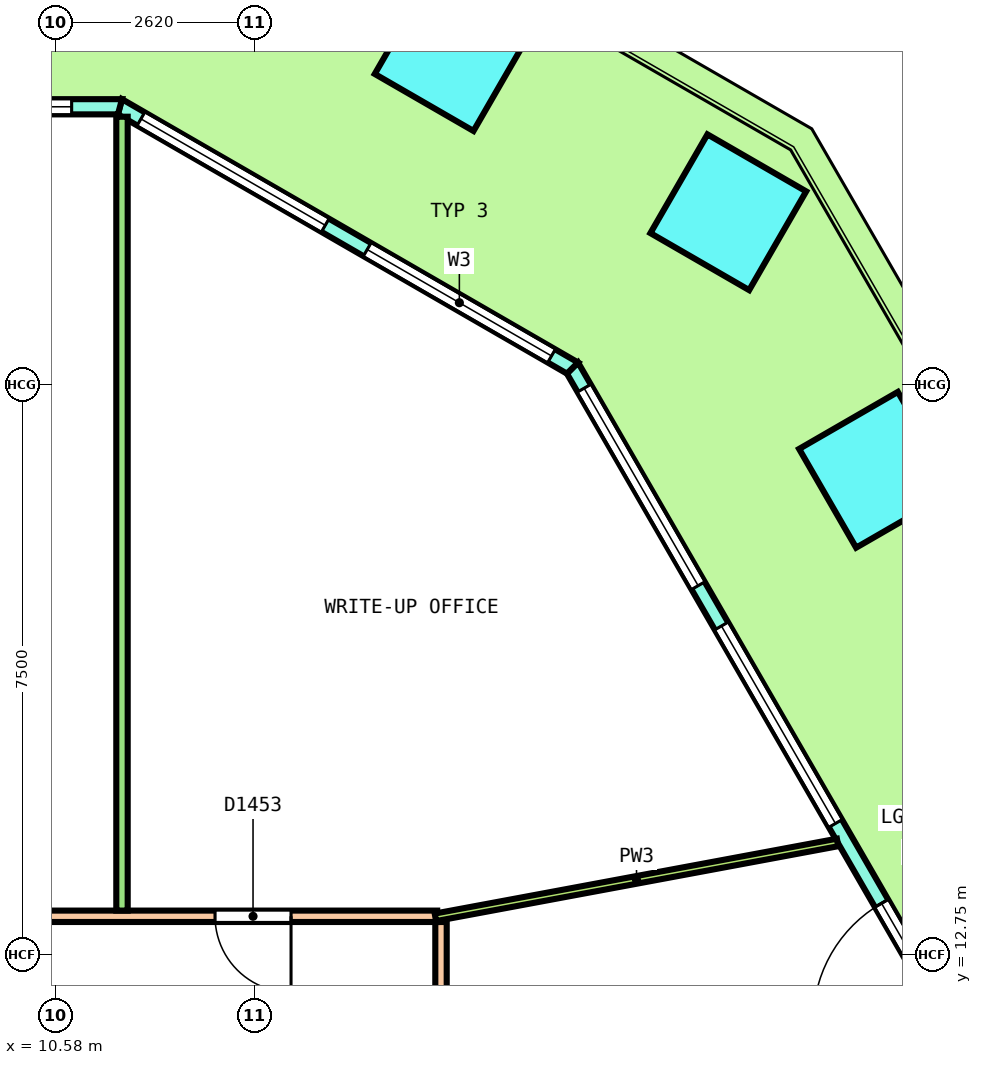
"""IFC4 building model, lengths in metres.
Left out: names, types, materials, properties, quantities, classifications, styles, units other than length and angle.
Written with IfcOpenShell. Run it as: python <this file> out.ifc"""

import sys

from ifc_helpers import new_model, si_unit, direction, frame, frame_2d, origin, origin_2d, place, context, subcontext, project, spatial, polyline, rectangle, outline, extrude, element, fill, save


model = new_model("IFC4")
c1 = context("Model", 3, precision=1e-05, world=origin(), true_north=direction((0.0, 1.0)))
c2 = subcontext(c1, "Body", "Model", "MODEL_VIEW")
j1 = project(units=[si_unit("LENGTHUNIT", "METRE"), si_unit("PLANEANGLEUNIT", "RADIAN")], contexts=[c1])
p1 = place(None, origin())
s1 = spatial("IfcSite", under=j1, at=p1, CompositionType="ELEMENT")
p2 = place(p1, origin())
s2 = spatial("IfcBuilding", under=s1, at=p2, CompositionType="ELEMENT")
p3 = place(p2, frame((0.0, 0.0, 63.0)))
s3 = spatial("IfcBuildingStorey", under=s2, at=p3, CompositionType="ELEMENT", Elevation=63.0)
for number, where, z_axis, x_axis in (
    (1, (21.386, 19.124, 0.0), (0.0, 0.0, 1.0), (-0.5, 0.866, 0.0)),
    (2, (19.43, 22.512, 0.0), (0.0, 0.0, 1.0), (-0.866, 0.5, 0.0)),
    (3, (15.803, 24.606, 0.0), (0.0, 0.0, 1.0), (-0.866, 0.5, 0.0)),
):
    element("IfcColumn", number, at=place(p3, frame(where, z_axis=z_axis, x_axis=x_axis)), inside=s3, PredefinedType="COLUMN", context=c2, shape_type="SweptSolid", body=[
        extrude(rectangle(XDim=1.5, YDim=1.5, at=origin_2d()), origin(), (0.0, 0.0, 1.0), 4.04),
    ])
p4 = place(p3, frame((26.411, 4.82, 0.0), z_axis=(0.0, 0.0, 1.0), x_axis=(-0.500000137386, 0.866025324465, 0.0)))
e4 = element("IfcWall", 4, at=p4, inside=s3, PredefinedType="SOLIDWALL", context=c2, shape_type="SweptSolid", body=[
    extrude(outline(polyline([(-0.027, -0.1), (0.979, -0.1), (1.986, -0.1), (2.992, -0.1), (3.999, -0.1), (5.005, -0.1), (6.012, -0.1), (7.018, -0.1), (8.025, -0.1), (9.031, -0.1), (10.038, -0.1), (11.044, -0.1), (12.051, -0.1), (13.057, -0.1), (14.063, -0.1), (15.07, -0.1), (16.076, -0.1), (17.083, -0.1), (18.089, -0.1), (18.036, 0.1), (17.035, 0.1), (16.035, 0.1), (15.034, 0.1), (14.034, 0.1), (13.033, 0.1), (12.033, 0.1), (11.032, 0.1), (10.032, 0.1), (9.031, 0.1), (8.031, 0.1), (7.03, 0.1), (6.03, 0.1), (5.029, 0.1), (4.029, 0.1), (3.028, 0.1), (2.028, 0.1), (1.027, 0.1), (0.027, 0.1), (-0.027, -0.1)])), origin(), (0.0, 0.0, 1.0), 4.1),
])
p5 = place(p4, frame((0.306, 0.0, 0.1)))
e5 = element("IfcOpeningElement", 5, at=p5, cuts=e4, PredefinedType="OPENING", context=c2, shape_type="SweptSolid", body=[
    extrude(rectangle(XDim=3.0, YDim=2.9, at=frame_2d((1.5, 1.45))), frame((0.0, 0.11, 0.0), z_axis=(0.0, -1.0, 0.0), x_axis=(1.0, 0.0, 0.0)), (0.0, 0.0, 1.0), 0.22),
])
p6 = place(p4, frame((3.919, 0.0, 0.1)))
e6 = element("IfcOpeningElement", 6, at=p6, cuts=e4, PredefinedType="OPENING", context=c2, shape_type="SweptSolid", body=[
    extrude(rectangle(XDim=3.0, YDim=2.9, at=frame_2d((1.5, 1.45))), frame((0.0, 0.11, 0.0), z_axis=(0.0, -1.0, 0.0), x_axis=(1.0, 0.0, 0.0)), (0.0, 0.0, 1.0), 0.22),
])
p7 = place(p4, frame((8.131, 0.0, 0.0)))
e7 = element("IfcOpeningElement", 7, at=p7, cuts=e4, PredefinedType="OPENING", context=c2, shape_type="SweptSolid", body=[
    extrude(rectangle(XDim=1.8, YDim=2.4, at=frame_2d((0.9, 1.2))), frame((0.0, 0.11, 0.0), z_axis=(0.0, -1.0, 0.0), x_axis=(1.0, 0.0, 0.0)), (0.0, 0.0, 1.0), 0.22),
])
p8 = place(p4, frame((8.131, 0.0, 2.55)))
e8 = element("IfcOpeningElement", 8, at=p8, cuts=e4, PredefinedType="OPENING", context=c2, shape_type="SweptSolid", body=[
    extrude(rectangle(XDim=1.8, YDim=0.45, at=frame_2d((0.9, 0.225))), frame((0.0, 0.11, 0.0), z_axis=(0.0, -1.0, 0.0), x_axis=(1.0, 0.0, 0.0)), (0.0, 0.0, 1.0), 0.22),
])
p9 = place(p4, frame((11.144, 0.0, 0.1)))
e9 = element("IfcOpeningElement", 9, at=p9, cuts=e4, PredefinedType="OPENING", context=c2, shape_type="SweptSolid", body=[
    extrude(rectangle(XDim=3.0, YDim=2.9, at=frame_2d((1.5, 1.45))), frame((0.0, 0.11, 0.0), z_axis=(0.0, -1.0, 0.0), x_axis=(1.0, 0.0, 0.0)), (0.0, 0.0, 1.0), 0.22),
])
p10 = place(p4, frame((14.756, 0.0, 0.1)))
e10 = element("IfcOpeningElement", 10, at=p10, cuts=e4, PredefinedType="OPENING", context=c2, shape_type="SweptSolid", body=[
    extrude(rectangle(XDim=3.0, YDim=2.9, at=frame_2d((1.5, 1.45))), frame((0.0, 0.11, 0.0), z_axis=(0.0, -1.0, 0.0), x_axis=(1.0, 0.0, 0.0)), (0.0, 0.0, 1.0), 0.22),
])
p11 = place(p3, frame((17.38, 20.463, 0.0), z_axis=(0.0, 0.0, 1.0), x_axis=(-0.866029458321, 0.49999297727, 0.0)))
e11 = element("IfcWall", 11, at=p11, inside=s3, PredefinedType="SOLIDWALL", context=c2, shape_type="SweptSolid", body=[
    extrude(outline(polyline([(-0.027, -0.1), (1.128, -0.1), (2.282, -0.1), (3.437, -0.1), (4.592, -0.1), (5.747, -0.1), (6.901, -0.1), (6.848, 0.1), (5.711, 0.1), (4.574, 0.1), (3.437, 0.1), (2.301, 0.1), (1.164, 0.1), (0.027, 0.1), (-0.027, -0.1)])), origin(), (0.0, 0.0, 1.0), 4.1),
])
p12 = place(p11, frame((0.319, 0.0, 0.1)))
e12 = element("IfcOpeningElement", 12, at=p12, cuts=e11, PredefinedType="OPENING", context=c2, shape_type="SweptSolid", body=[
    extrude(rectangle(XDim=2.8, YDim=2.9, at=frame_2d((1.4, 1.45))), frame((0.0, 0.11, 0.0), z_axis=(0.0, -1.0, 0.0), x_axis=(1.0, 0.0, 0.0)), (0.0, 0.0, 1.0), 0.22),
])
p13 = place(p11, frame((3.756, 0.0, 0.1)))
e13 = element("IfcOpeningElement", 13, at=p13, cuts=e11, PredefinedType="OPENING", context=c2, shape_type="SweptSolid", body=[
    extrude(rectangle(XDim=2.8, YDim=2.9, at=frame_2d((1.4, 1.45))), frame((0.0, 0.11, 0.0), z_axis=(0.0, -1.0, 0.0), x_axis=(1.0, 0.0, 0.0)), (0.0, 0.0, 1.0), 0.22),
])
p14 = place(p3, frame((11.426, 23.9, 0.0), z_axis=(0.0, 0.0, 1.0), x_axis=(-1.0, 0.0, 0.0)))
e14 = element("IfcWall", 14, at=p14, inside=s3, PredefinedType="SOLIDWALL", context=c2, shape_type="SweptSolid", body=[
    extrude(outline(polyline([(-0.027, -0.1), (1.014, -0.1), (2.055, -0.1), (3.097, -0.1), (4.138, -0.1), (5.179, -0.1), (6.22, -0.1), (7.261, -0.1), (8.303, -0.1), (9.344, -0.1), (10.385, -0.1), (11.426, -0.1), (12.468, -0.1), (13.509, -0.1), (14.55, -0.1), (15.591, -0.1), (16.632, -0.1), (17.673, -0.1), (18.715, -0.1), (19.756, -0.1), (20.797, -0.1), (21.838, -0.1), (22.879, -0.1), (22.826, 0.1), (21.789, 0.1), (20.753, 0.1), (19.717, 0.1), (18.68, 0.1), (17.644, 0.1), (16.608, 0.1), (15.572, 0.1), (14.535, 0.1), (13.499, 0.1), (12.463, 0.1), (11.426, 0.1), (10.39, 0.1), (9.354, 0.1), (8.317, 0.1), (7.281, 0.1), (6.245, 0.1), (5.208, 0.1), (4.172, 0.1), (3.136, 0.1), (2.099, 0.1), (1.063, 0.1), (0.027, 0.1), (-0.027, -0.1)])), origin(), (0.0, 0.0, 1.0), 4.1),
])
p15 = place(p14, frame((0.635, 0.0, 0.1)))
e15 = element("IfcOpeningElement", 15, at=p15, cuts=e14, PredefinedType="OPENING", context=c2, shape_type="SweptSolid", body=[
    extrude(rectangle(XDim=3.3, YDim=2.9, at=frame_2d((1.65, 1.45))), frame((0.0, 0.11, 0.0), z_axis=(0.0, -1.0, 0.0), x_axis=(1.0, 0.0, 0.0)), (0.0, 0.0, 1.0), 0.22),
])
p16 = place(p14, frame((5.206, 0.0, 0.1)))
e16 = element("IfcOpeningElement", 16, at=p16, cuts=e14, PredefinedType="OPENING", context=c2, shape_type="SweptSolid", body=[
    extrude(rectangle(XDim=3.3, YDim=2.9, at=frame_2d((1.65, 1.45))), frame((0.0, 0.11, 0.0), z_axis=(0.0, -1.0, 0.0), x_axis=(1.0, 0.0, 0.0)), (0.0, 0.0, 1.0), 0.22),
])
p17 = place(p14, frame((10.526, 0.0, 0.0)))
e17 = element("IfcOpeningElement", 17, at=p17, cuts=e14, PredefinedType="OPENING", context=c2, shape_type="SweptSolid", body=[
    extrude(rectangle(XDim=1.8, YDim=2.4, at=frame_2d((0.9, 1.2))), frame((0.0, 0.11, 0.0), z_axis=(0.0, -1.0, 0.0), x_axis=(1.0, 0.0, 0.0)), (0.0, 0.0, 1.0), 0.22),
])
p18 = place(p14, frame((10.526, 0.0, 2.55)))
e18 = element("IfcOpeningElement", 18, at=p18, cuts=e14, PredefinedType="OPENING", context=c2, shape_type="SweptSolid", body=[
    extrude(rectangle(XDim=1.8, YDim=0.45, at=frame_2d((0.9, 0.225))), frame((0.0, 0.11, 0.0), z_axis=(0.0, -1.0, 0.0), x_axis=(1.0, 0.0, 0.0)), (0.0, 0.0, 1.0), 0.22),
])
p19 = place(p14, frame((14.347, 0.0, 0.1)))
e19 = element("IfcOpeningElement", 19, at=p19, cuts=e14, PredefinedType="OPENING", context=c2, shape_type="SweptSolid", body=[
    extrude(rectangle(XDim=3.3, YDim=2.9, at=frame_2d((1.65, 1.45))), frame((0.0, 0.11, 0.0), z_axis=(0.0, -1.0, 0.0), x_axis=(1.0, 0.0, 0.0)), (0.0, 0.0, 1.0), 0.22),
])
p20 = place(p14, frame((18.917, 0.0, 0.1)))
e20 = element("IfcOpeningElement", 20, at=p20, cuts=e14, PredefinedType="OPENING", context=c2, shape_type="SweptSolid", body=[
    extrude(rectangle(XDim=3.3, YDim=2.9, at=frame_2d((1.65, 1.45))), frame((0.0, 0.11, 0.0), z_axis=(0.0, -1.0, 0.0), x_axis=(1.0, 0.0, 0.0)), (0.0, 0.0, 1.0), 0.22),
])
p21 = place(p3, frame((15.65, -13.175, 0.0), z_axis=(0.0, 0.0, 1.0), x_axis=(0.0, 1.0, 0.0)))
e21 = element("IfcWall", 21, at=p21, inside=s3, PredefinedType="PARTITIONING", context=c2, shape_type="SweptSolid", body=[
    extrude(rectangle(XDim=26.35, YDim=0.15, at=frame_2d((13.175, 0.0))), origin(), (0.0, 0.0, 1.0), 3.05),
])
p22 = place(p21, frame((16.576, 0.0, 0.0)))
e22 = element("IfcOpeningElement", 22, at=p22, cuts=e21, PredefinedType="OPENING", context=c2, shape_type="SweptSolid", body=[
    extrude(rectangle(XDim=1.2, YDim=2.1, at=frame_2d((0.6, 1.05))), frame((0.0, 0.085, 0.0), z_axis=(0.0, -1.0, 0.0), x_axis=(1.0, 0.0, 0.0)), (0.0, 0.0, 1.0), 0.17),
])
p23 = place(p21, frame((22.401, 0.0, 0.0)))
e23 = element("IfcOpeningElement", 23, at=p23, cuts=e21, PredefinedType="OPENING", context=c2, shape_type="SweptSolid", body=[
    extrude(rectangle(XDim=1.0, YDim=2.1, at=frame_2d((0.5, 1.05))), frame((0.0, 0.085, 0.0), z_axis=(0.0, -1.0, 0.0), x_axis=(1.0, 0.0, 0.0)), (0.0, 0.0, 1.0), 0.17),
])
p24 = place(p21, frame((1.65, 0.0, 0.0)))
e24 = element("IfcOpeningElement", 24, at=p24, cuts=e21, PredefinedType="OPENING", context=c2, shape_type="SweptSolid", body=[
    extrude(rectangle(XDim=1.0, YDim=2.1, at=frame_2d((0.5, 1.05))), frame((0.0, 0.085, 0.0), z_axis=(0.0, -1.0, 0.0), x_axis=(1.0, 0.0, 0.0)), (0.0, 0.0, 1.0), 0.17),
])
p25 = place(p3, frame((-15.575, 13.25, 0.0), z_axis=(0.0, 0.0, 1.0), x_axis=(1.0, 0.0, 0.0)))
e25 = element("IfcWall", 25, at=p25, inside=s3, PredefinedType="PARTITIONING", context=c2, shape_type="SweptSolid", body=[
    extrude(rectangle(XDim=31.175, YDim=0.15, at=frame_2d((15.587, 0.0))), origin(), (0.0, 0.0, 1.0), 3.05),
])
p26 = place(p25, frame((28.252, 0.0, 0.0)))
e26 = element("IfcOpeningElement", 26, at=p26, cuts=e25, PredefinedType="OPENING", context=c2, shape_type="SweptSolid", body=[
    extrude(rectangle(XDim=1.0, YDim=2.1, at=frame_2d((0.5, 1.05))), frame((0.0, 0.085, 0.0), z_axis=(0.0, -1.0, 0.0), x_axis=(1.0, 0.0, 0.0)), (0.0, 0.0, 1.0), 0.17),
])
p27 = place(p25, frame((14.802, 0.0, 0.0)))
e27 = element("IfcOpeningElement", 27, at=p27, cuts=e25, PredefinedType="OPENING", context=c2, shape_type="SweptSolid", body=[
    extrude(rectangle(XDim=1.2, YDim=2.1, at=frame_2d((0.6, 1.05))), frame((0.0, 0.085, 0.0), z_axis=(0.0, -1.0, 0.0), x_axis=(1.0, 0.0, 0.0)), (0.0, 0.0, 1.0), 0.17),
])
p28 = place(p25, frame((5.812, 0.0, 0.0)))
e28 = element("IfcOpeningElement", 28, at=p28, cuts=e25, PredefinedType="OPENING", context=c2, shape_type="SweptSolid", body=[
    extrude(rectangle(XDim=1.2, YDim=2.1, at=frame_2d((0.6, 1.05))), frame((0.0, 0.085, 0.0), z_axis=(0.0, -1.0, 0.0), x_axis=(1.0, 0.0, 0.0)), (0.0, 0.0, 1.0), 0.17),
])
p29 = place(p25, frame((0.849, 0.0, 0.0)))
e29 = element("IfcOpeningElement", 29, at=p29, cuts=e25, PredefinedType="OPENING", context=c2, shape_type="SweptSolid", body=[
    extrude(rectangle(XDim=1.2, YDim=2.1, at=frame_2d((0.6, 1.05))), frame((0.0, 0.085, 0.0), z_axis=(0.0, -1.0, 0.0), x_axis=(1.0, 0.0, 0.0)), (0.0, 0.0, 1.0), 0.17),
])
p30 = place(p3, frame((11.453, 13.325, 0.0), z_axis=(0.0, 0.0, 1.0), x_axis=(0.0, 1.0, 0.0)))
e30 = element("IfcWall", 30, at=p30, inside=s3, PredefinedType="PARTITIONING", context=c2, shape_type="SweptSolid", body=[
    extrude(rectangle(XDim=10.444, YDim=0.15, at=frame_2d((5.222, 0.0))), origin(), (0.0, 0.0, 1.0), 3.05),
])
p31 = place(p3, frame((15.576, 13.236, 0.0), z_axis=(0.0, 0.0, 1.0), x_axis=(0.983108608108, 0.183023126037, 0.0)))
e31 = element("IfcWall", 31, at=p31, inside=s3, PredefinedType="PARTITIONING", context=c2, shape_type="SweptSolid", body=[
    extrude(rectangle(XDim=5.382, YDim=0.1, at=frame_2d((2.691, 0.0))), origin(), (0.0, 0.0, 1.0), 3.05),
])
p32 = place(p7, origin())
e32 = element("IfcDoor", 32, at=p32, inside=s3, OperationType="DOUBLE_DOOR_SINGLE_SWING", PredefinedType="DOOR", context=c2, shape_type="SweptSolid", body=[
    extrude(rectangle(XDim=1.8, YDim=2.4, at=frame_2d((0.9, 1.2))), frame((0.0, 0.025, 0.0), z_axis=(0.0, -1.0, 0.0), x_axis=(1.0, 0.0, 0.0)), (0.0, 0.0, 1.0), 0.05),
])
fill(e7, e32)
p33 = place(p8, origin())
e33 = element("IfcWindow", 33, at=p33, inside=s3, PartitioningType="SINGLE_PANEL", PredefinedType="WINDOW", context=c2, shape_type="SweptSolid", body=[
    extrude(rectangle(XDim=1.8, YDim=0.45, at=frame_2d((0.9, 0.225))), frame((0.0, 0.03, 0.0), z_axis=(0.0, -1.0, 0.0), x_axis=(1.0, 0.0, 0.0)), (0.0, 0.0, 1.0), 0.06),
])
fill(e8, e33)
p34 = place(p9, origin())
e34 = element("IfcWindow", 34, at=p34, inside=s3, PartitioningType="SINGLE_PANEL", PredefinedType="WINDOW", context=c2, shape_type="SweptSolid", body=[
    extrude(rectangle(XDim=3.0, YDim=2.9, at=frame_2d((1.5, 1.45))), frame((0.0, 0.03, 0.0), z_axis=(0.0, -1.0, 0.0), x_axis=(1.0, 0.0, 0.0)), (0.0, 0.0, 1.0), 0.06),
])
fill(e9, e34)
p35 = place(p10, origin())
e35 = element("IfcWindow", 35, at=p35, inside=s3, PartitioningType="SINGLE_PANEL", PredefinedType="WINDOW", context=c2, shape_type="SweptSolid", body=[
    extrude(rectangle(XDim=3.0, YDim=2.9, at=frame_2d((1.5, 1.45))), frame((0.0, 0.03, 0.0), z_axis=(0.0, -1.0, 0.0), x_axis=(1.0, 0.0, 0.0)), (0.0, 0.0, 1.0), 0.06),
])
fill(e10, e35)
p36 = place(p12, origin())
e36 = element("IfcWindow", 36, at=p36, inside=s3, PartitioningType="SINGLE_PANEL", PredefinedType="WINDOW", context=c2, shape_type="SweptSolid", body=[
    extrude(rectangle(XDim=2.8, YDim=2.9, at=frame_2d((1.4, 1.45))), frame((0.0, 0.03, 0.0), z_axis=(0.0, -1.0, 0.0), x_axis=(1.0, 0.0, 0.0)), (0.0, 0.0, 1.0), 0.06),
])
fill(e12, e36)
p37 = place(p13, origin())
e37 = element("IfcWindow", 37, at=p37, inside=s3, PartitioningType="SINGLE_PANEL", PredefinedType="WINDOW", context=c2, shape_type="SweptSolid", body=[
    extrude(rectangle(XDim=2.8, YDim=2.9, at=frame_2d((1.4, 1.45))), frame((0.0, 0.03, 0.0), z_axis=(0.0, -1.0, 0.0), x_axis=(1.0, 0.0, 0.0)), (0.0, 0.0, 1.0), 0.06),
])
fill(e13, e37)
p38 = place(p15, origin())
e38 = element("IfcWindow", 38, at=p38, inside=s3, PartitioningType="SINGLE_PANEL", PredefinedType="WINDOW", context=c2, shape_type="SweptSolid", body=[
    extrude(rectangle(XDim=3.3, YDim=2.9, at=frame_2d((1.65, 1.45))), frame((0.0, 0.03, 0.0), z_axis=(0.0, -1.0, 0.0), x_axis=(1.0, 0.0, 0.0)), (0.0, 0.0, 1.0), 0.06),
])
fill(e15, e38)
p39 = place(p26, origin())
e39 = element("IfcDoor", 39, at=p39, inside=s3, OperationType="SINGLE_SWING_LEFT", PredefinedType="DOOR", context=c2, shape_type="SweptSolid", body=[
    extrude(rectangle(XDim=1.0, YDim=2.1, at=frame_2d((0.5, 1.05))), frame((0.0, 0.025, 0.0), z_axis=(0.0, -1.0, 0.0), x_axis=(1.0, 0.0, 0.0)), (0.0, 0.0, 1.0), 0.05),
])
fill(e26, e39)
save(model, sys.argv[1])
